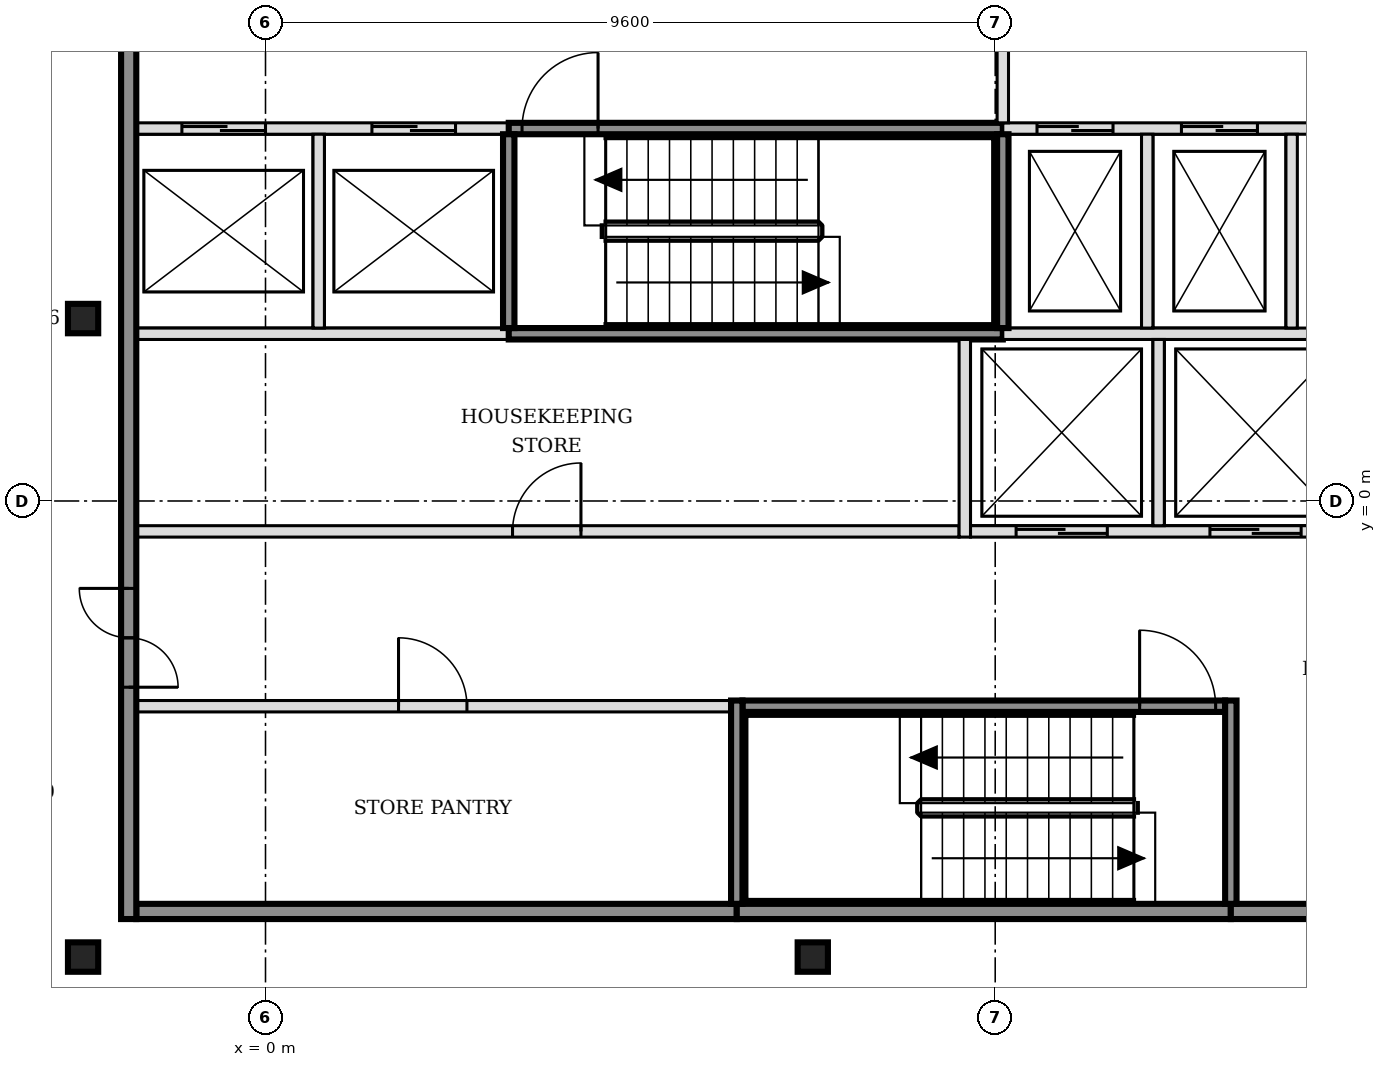
"""IFC4 building model, lengths in metres.
Left out: names, types, materials, properties, quantities, classifications, styles, units other than length and angle.
Written with IfcOpenShell. Run it as: python <this file> out.ifc"""

import sys

from ifc_helpers import new_model, si_unit, direction, frame, frame_2d, origin, origin_2d, place, context, subcontext, project, spatial, rectangle, i_section, extrude, element, fill, save


model = new_model("IFC4")
c1 = context("Model", 3, precision=1e-05, world=origin(), true_north=direction((0.0, 1.0)))
c2 = subcontext(c1, "Body", "Model", "MODEL_VIEW")
j1 = project(units=[si_unit("LENGTHUNIT", "METRE"), si_unit("PLANEANGLEUNIT", "RADIAN")], contexts=[c1])
p1 = place(None, origin())
s1 = spatial("IfcSite", under=j1, at=p1, CompositionType="ELEMENT")
p2 = place(p1, origin())
s2 = spatial("IfcBuilding", under=s1, at=p2, CompositionType="ELEMENT")
p3 = place(p2, frame((0.0, 0.0, 267.0)))
s3 = spatial("IfcBuildingStorey", under=s2, at=p3, CompositionType="ELEMENT", Elevation=267.0)
for number, where, z_axis, x_axis in (
    (1, (-2.4, -6.0, -0.15), (0.0, 0.0, 1.0), (1.0, 0.0, 0.0)),
    (2, (7.2, -6.0, -0.15), (0.0, 0.0, 1.0), (1.0, 0.0, 0.0)),
    (3, (-2.4, 2.4, -0.15), (0.0, 0.0, 1.0), (1.0, 0.0, 0.0)),
):
    element("IfcColumn", number, at=place(p3, frame(where, z_axis=z_axis, x_axis=x_axis)), inside=s3, PredefinedType="COLUMN", context=c2, shape_type="SweptSolid", body=[
        extrude(i_section(OverallWidth=0.398, OverallDepth=0.387, WebThickness=0.021, FlangeThickness=0.033, FilletRadius=0.015, at=origin_2d()), origin(), (0.0, 0.0, 1.0), 3.6),
    ])
p4 = place(p3, frame((-1.7, -5.4, 0.0), z_axis=(0.0, 0.0, 1.0), x_axis=(1.0, 0.0, 0.0)))
e4 = element("IfcWall", 4, at=p4, inside=s3, PredefinedType="SOLIDWALL", context=c2, shape_type="SweptSolid", body=[
    extrude(rectangle(XDim=7.9, YDim=0.2, at=frame_2d((3.95, 0.0))), origin(), (0.0, 0.0, 1.0), 3.45),
])
p5 = place(p3, frame((6.2, -5.4, 0.0), z_axis=(0.0, 0.0, 1.0), x_axis=(1.0, 0.0, 0.0)))
e5 = element("IfcWall", 5, at=p5, inside=s3, PredefinedType="SOLIDWALL", context=c2, shape_type="SweptSolid", body=[
    extrude(rectangle(XDim=6.5, YDim=0.2, at=frame_2d((3.25, 0.0))), origin(), (0.0, 0.0, 1.0), 3.45),
])
p6 = place(p3, frame((12.7, -5.4, 0.0), z_axis=(0.0, 0.0, 1.0), x_axis=(1.0, 0.0, 0.0)))
e6 = element("IfcWall", 6, at=p6, inside=s3, PredefinedType="SOLIDWALL", context=c2, shape_type="SweptSolid", body=[
    extrude(rectangle(XDim=3.4, YDim=0.2, at=frame_2d((1.7, 0.0))), origin(), (0.0, 0.0, 1.0), 3.45),
])
p7 = place(p3, frame((-1.7, -2.7, 0.0), z_axis=(0.0, 0.0, 1.0), x_axis=(1.0, 0.0, 0.0)))
e7 = element("IfcWall", 7, at=p7, inside=s3, PredefinedType="PARTITIONING", context=c2, shape_type="SweptSolid", body=[
    extrude(rectangle(XDim=7.825, YDim=0.15, at=frame_2d((3.913, 0.0))), origin(), (0.0, 0.0, 1.0), 3.45),
])
p8 = place(p7, frame((3.45, 0.0, 0.0)))
e8 = element("IfcOpeningElement", 8, at=p8, cuts=e7, PredefinedType="OPENING", context=c2, shape_type="SweptSolid", body=[
    extrude(rectangle(XDim=0.9, YDim=2.1, at=frame_2d((0.45, 1.05))), frame((0.0, 0.085, 0.0), z_axis=(0.0, -1.0, 0.0), x_axis=(1.0, 0.0, 0.0)), (0.0, 0.0, 1.0), 0.17),
])
p9 = place(p3, frame((6.275, -2.7, 0.0), z_axis=(0.0, 0.0, 1.0), x_axis=(1.0, 0.0, 0.0)))
e9 = element("IfcWall", 9, at=p9, inside=s3, PredefinedType="SOLIDWALL", context=c2, shape_type="SweptSolid", body=[
    extrude(rectangle(XDim=6.35, YDim=0.15, at=frame_2d((3.175, 0.0))), origin(), (0.0, 0.0, 1.0), 3.45),
])
p10 = place(p9, frame((5.225, 0.0, 0.0)))
e10 = element("IfcOpeningElement", 10, at=p10, cuts=e9, PredefinedType="OPENING", context=c2, shape_type="SweptSolid", body=[
    extrude(rectangle(XDim=1.0, YDim=2.1, at=frame_2d((0.5, 1.05))), frame((0.0, 0.085, 0.0), z_axis=(0.0, -1.0, 0.0), x_axis=(1.0, 0.0, 0.0)), (0.0, 0.0, 1.0), 0.17),
])
p11 = place(p3, frame((-1.7, -0.4, 0.0), z_axis=(0.0, 0.0, 1.0), x_axis=(1.0, 0.0, 0.0)))
e11 = element("IfcWall", 11, at=p11, inside=s3, PredefinedType="PARTITIONING", context=c2, shape_type="SweptSolid", body=[
    extrude(rectangle(XDim=10.825, YDim=0.15, at=frame_2d((5.413, 0.0))), origin(), (0.0, 0.0, 1.0), 3.45),
])
p12 = place(p11, frame((4.95, 0.0, 0.0)))
e12 = element("IfcOpeningElement", 12, at=p12, cuts=e11, PredefinedType="OPENING", context=c2, shape_type="SweptSolid", body=[
    extrude(rectangle(XDim=0.9, YDim=2.1, at=frame_2d((0.45, 1.05))), frame((0.0, 0.085, 0.0), z_axis=(0.0, -1.0, 0.0), x_axis=(1.0, 0.0, 0.0)), (0.0, 0.0, 1.0), 0.17),
])
p13 = place(p3, frame((9.275, -0.4, 0.0), z_axis=(0.0, 0.0, 1.0), x_axis=(1.0, 0.0, 0.0)))
e13 = element("IfcWall", 13, at=p13, inside=s3, PredefinedType="SOLIDWALL", context=c2, shape_type="SweptSolid", body=[
    extrude(rectangle(XDim=4.95, YDim=0.15, at=frame_2d((2.475, 0.0))), origin(), (0.0, 0.0, 1.0), 3.45),
])
p14 = place(p13, frame((0.6, 0.0, 0.0)))
e14 = element("IfcOpeningElement", 14, at=p14, cuts=e13, PredefinedType="OPENING", context=c2, shape_type="SweptSolid", body=[
    extrude(rectangle(XDim=1.2, YDim=2.1, at=frame_2d((0.6, 1.05))), frame((0.0, 0.085, 0.0), z_axis=(0.0, -1.0, 0.0), x_axis=(1.0, 0.0, 0.0)), (0.0, 0.0, 1.0), 0.17),
])
p15 = place(p13, frame((3.15, 0.0, 0.0)))
e15 = element("IfcOpeningElement", 15, at=p15, cuts=e13, PredefinedType="OPENING", context=c2, shape_type="SweptSolid", body=[
    extrude(rectangle(XDim=1.2, YDim=2.1, at=frame_2d((0.6, 1.05))), frame((0.0, 0.085, 0.0), z_axis=(0.0, -1.0, 0.0), x_axis=(1.0, 0.0, 0.0)), (0.0, 0.0, 1.0), 0.17),
])
p16 = place(p3, frame((-1.7, 2.2, 0.0), z_axis=(0.0, 0.0, 1.0), x_axis=(1.0, 0.0, 0.0)))
e16 = element("IfcWall", 16, at=p16, inside=s3, PredefinedType="SOLIDWALL", context=c2, shape_type="SweptSolid", body=[
    extrude(rectangle(XDim=4.9, YDim=0.15, at=frame_2d((2.45, 0.0))), origin(), (0.0, 0.0, 1.0), 3.45),
])
p17 = place(p3, frame((3.2, 2.2, 0.0), z_axis=(0.0, 0.0, 1.0), x_axis=(1.0, 0.0, 0.0)))
e17 = element("IfcWall", 17, at=p17, inside=s3, PredefinedType="SOLIDWALL", context=c2, shape_type="SweptSolid", body=[
    extrude(rectangle(XDim=6.5, YDim=0.15, at=frame_2d((3.25, 0.0))), origin(), (0.0, 0.0, 1.0), 3.45),
])
p18 = place(p3, frame((9.7, 2.2, 0.0), z_axis=(0.0, 0.0, 1.0), x_axis=(1.0, 0.0, 0.0)))
e18 = element("IfcWall", 18, at=p18, inside=s3, PredefinedType="SOLIDWALL", context=c2, shape_type="SweptSolid", body=[
    extrude(rectangle(XDim=4.525, YDim=0.15, at=frame_2d((2.263, 0.0))), origin(), (0.0, 0.0, 1.0), 3.45),
])
p19 = place(p3, frame((-1.7, 4.9, 0.0), z_axis=(0.0, 0.0, 1.0), x_axis=(1.0, 0.0, 0.0)))
e19 = element("IfcWall", 19, at=p19, inside=s3, PredefinedType="SOLIDWALL", context=c2, shape_type="SweptSolid", body=[
    extrude(rectangle(XDim=4.9, YDim=0.15, at=frame_2d((2.45, 0.0))), origin(), (0.0, 0.0, 1.0), 3.45),
])
p20 = place(p19, frame((0.6, 0.0, 0.0)))
e20 = element("IfcOpeningElement", 20, at=p20, cuts=e19, PredefinedType="OPENING", context=c2, shape_type="SweptSolid", body=[
    extrude(rectangle(XDim=1.1, YDim=2.1, at=frame_2d((0.55, 1.05))), frame((0.0, 0.085, 0.0), z_axis=(0.0, -1.0, 0.0), x_axis=(1.0, 0.0, 0.0)), (0.0, 0.0, 1.0), 0.17),
])
p21 = place(p19, frame((3.1, 0.0, 0.0)))
e21 = element("IfcOpeningElement", 21, at=p21, cuts=e19, PredefinedType="OPENING", context=c2, shape_type="SweptSolid", body=[
    extrude(rectangle(XDim=1.1, YDim=2.1, at=frame_2d((0.55, 1.05))), frame((0.0, 0.085, 0.0), z_axis=(0.0, -1.0, 0.0), x_axis=(1.0, 0.0, 0.0)), (0.0, 0.0, 1.0), 0.17),
])
p22 = place(p3, frame((3.2, 4.9, 0.0), z_axis=(0.0, 0.0, 1.0), x_axis=(1.0, 0.0, 0.0)))
e22 = element("IfcWall", 22, at=p22, inside=s3, PredefinedType="SOLIDWALL", context=c2, shape_type="SweptSolid", body=[
    extrude(rectangle(XDim=6.5, YDim=0.15, at=frame_2d((3.25, 0.0))), origin(), (0.0, 0.0, 1.0), 3.45),
])
p23 = place(p22, frame((0.175, 0.0, 0.0)))
e23 = element("IfcOpeningElement", 23, at=p23, cuts=e22, PredefinedType="OPENING", context=c2, shape_type="SweptSolid", body=[
    extrude(rectangle(XDim=1.0, YDim=2.1, at=frame_2d((0.5, 1.05))), frame((0.0, 0.085, 0.0), z_axis=(0.0, -1.0, 0.0), x_axis=(1.0, 0.0, 0.0)), (0.0, 0.0, 1.0), 0.17),
])
p24 = place(p3, frame((9.7, 4.9, 0.0), z_axis=(0.0, 0.0, 1.0), x_axis=(1.0, 0.0, 0.0)))
e24 = element("IfcWall", 24, at=p24, inside=s3, PredefinedType="SOLIDWALL", context=c2, shape_type="SweptSolid", body=[
    extrude(rectangle(XDim=6.4, YDim=0.15, at=frame_2d((3.2, 0.0))), origin(), (0.0, 0.0, 1.0), 3.45),
])
p25 = place(p24, frame((0.45, 0.0, 0.0)))
e25 = element("IfcOpeningElement", 25, at=p25, cuts=e24, PredefinedType="OPENING", context=c2, shape_type="SweptSolid", body=[
    extrude(rectangle(XDim=1.0, YDim=2.1, at=frame_2d((0.5, 1.05))), frame((0.0, 0.085, 0.0), z_axis=(0.0, -1.0, 0.0), x_axis=(1.0, 0.0, 0.0)), (0.0, 0.0, 1.0), 0.17),
])
p26 = place(p24, frame((2.35, 0.0, 0.0)))
e26 = element("IfcOpeningElement", 26, at=p26, cuts=e24, PredefinedType="OPENING", context=c2, shape_type="SweptSolid", body=[
    extrude(rectangle(XDim=1.0, YDim=2.1, at=frame_2d((0.5, 1.05))), frame((0.0, 0.085, 0.0), z_axis=(0.0, -1.0, 0.0), x_axis=(1.0, 0.0, 0.0)), (0.0, 0.0, 1.0), 0.17),
])
p27 = place(p24, frame((4.7, 0.0, 0.0)))
e27 = element("IfcOpeningElement", 27, at=p27, cuts=e24, PredefinedType="OPENING", context=c2, shape_type="SweptSolid", body=[
    extrude(rectangle(XDim=0.9, YDim=2.1, at=frame_2d((0.45, 1.05))), frame((0.0, 0.085, 0.0), z_axis=(0.0, -1.0, 0.0), x_axis=(1.0, 0.0, 0.0)), (0.0, 0.0, 1.0), 0.17),
])
p28 = place(p3, frame((-1.8, -5.5, 0.0), z_axis=(0.0, 0.0, 1.0), x_axis=(0.0, 1.0, 0.0)))
e28 = element("IfcWall", 28, at=p28, inside=s3, PredefinedType="SOLIDWALL", context=c2, shape_type="SweptSolid", body=[
    extrude(rectangle(XDim=15.8, YDim=0.2, at=frame_2d((7.9, 0.0))), origin(), (0.0, 0.0, 1.0), 3.45),
])
p29 = place(p28, frame((3.05, 0.0, 0.0)))
e29 = element("IfcOpeningElement", 29, at=p29, cuts=e28, PredefinedType="OPENING", context=c2, shape_type="SweptSolid", body=[
    extrude(rectangle(XDim=1.3, YDim=2.1, at=frame_2d((0.65, 1.05))), frame((0.0, 0.11, 0.0), z_axis=(0.0, -1.0, 0.0), x_axis=(1.0, 0.0, 0.0)), (0.0, 0.0, 1.0), 0.22),
])
p30 = place(p28, frame((11.45, 0.0, 0.0)))
e30 = element("IfcOpeningElement", 30, at=p30, cuts=e28, PredefinedType="OPENING", context=c2, shape_type="SweptSolid", body=[
    extrude(rectangle(XDim=1.3, YDim=2.1, at=frame_2d((0.65, 1.05))), frame((0.0, 0.11, 0.0), z_axis=(0.0, -1.0, 0.0), x_axis=(1.0, 0.0, 0.0)), (0.0, 0.0, 1.0), 0.22),
])
for number, where, z_axis, x_axis in (
    (31, (0.7, 2.275, 0.0), (0.0, 0.0, 1.0), (0.0, 1.0, 0.0)),
    (32, (3.2, 2.275, 0.0), (0.0, 0.0, 1.0), (0.0, 1.0, 0.0)),
):
    element("IfcWall", number, at=place(p3, frame(where, z_axis=z_axis, x_axis=x_axis)), inside=s3, PredefinedType="SOLIDWALL", context=c2, shape_type="SweptSolid", body=[
        extrude(rectangle(XDim=2.55, YDim=0.15, at=frame_2d((1.275, 0.0))), origin(), (0.0, 0.0, 1.0), 3.45),
    ])
p31 = place(p3, frame((6.2, -5.3, 0.0), z_axis=(0.0, 0.0, 1.0), x_axis=(0.0, 1.0, 0.0)))
e33 = element("IfcWall", 33, at=p31, inside=s3, PredefinedType="SOLIDWALL", context=c2, shape_type="SweptSolid", body=[
    extrude(rectangle(XDim=2.675, YDim=0.15, at=frame_2d((1.337, 0.0))), origin(), (0.0, 0.0, 1.0), 3.45),
])
p32 = place(p3, frame((9.2, -0.475, 0.0), z_axis=(0.0, 0.0, 1.0), x_axis=(0.0, 1.0, 0.0)))
e34 = element("IfcWall", 34, at=p32, inside=s3, PredefinedType="SOLIDWALL", context=c2, shape_type="SweptSolid", body=[
    extrude(rectangle(XDim=2.6, YDim=0.15, at=frame_2d((1.3, 0.0))), origin(), (0.0, 0.0, 1.0), 3.45),
])
p33 = place(p3, frame((9.7, 2.275, 0.0), z_axis=(0.0, 0.0, 1.0), x_axis=(0.0, 1.0, 0.0)))
e35 = element("IfcWall", 35, at=p33, inside=s3, PredefinedType="SOLIDWALL", context=c2, shape_type="SweptSolid", body=[
    extrude(rectangle(XDim=2.55, YDim=0.15, at=frame_2d((1.275, 0.0))), origin(), (0.0, 0.0, 1.0), 3.45),
])
p34 = place(p3, frame((9.7, 4.975, 0.0), z_axis=(0.0, 0.0, 1.0), x_axis=(0.0, 1.0, 0.0)))
e36 = element("IfcWall", 36, at=p34, inside=s3, PredefinedType="SOLIDWALL", context=c2, shape_type="SweptSolid", body=[
    extrude(rectangle(XDim=2.45, YDim=0.15, at=frame_2d((1.225, 0.0))), origin(), (0.0, 0.0, 1.0), 3.45),
])
p35 = place(p3, frame((11.6, 2.275, 0.0), z_axis=(0.0, 0.0, 1.0), x_axis=(0.0, 1.0, 0.0)))
e37 = element("IfcWall", 37, at=p35, inside=s3, PredefinedType="SOLIDWALL", context=c2, shape_type="SweptSolid", body=[
    extrude(rectangle(XDim=2.55, YDim=0.15, at=frame_2d((1.275, 0.0))), origin(), (0.0, 0.0, 1.0), 3.45),
])
p36 = place(p3, frame((11.75, -0.325, 0.0), z_axis=(0.0, 0.0, 1.0), x_axis=(0.0, 1.0, 0.0)))
e38 = element("IfcWall", 38, at=p36, inside=s3, PredefinedType="SOLIDWALL", context=c2, shape_type="SweptSolid", body=[
    extrude(rectangle(XDim=2.45, YDim=0.15, at=frame_2d((1.225, 0.0))), origin(), (0.0, 0.0, 1.0), 3.45),
])
p37 = place(p3, frame((12.7, -5.3, 0.0), z_axis=(0.0, 0.0, 1.0), x_axis=(0.0, 1.0, 0.0)))
e39 = element("IfcWall", 39, at=p37, inside=s3, PredefinedType="SOLIDWALL", context=c2, shape_type="SweptSolid", body=[
    extrude(rectangle(XDim=2.675, YDim=0.15, at=frame_2d((1.337, 0.0))), origin(), (0.0, 0.0, 1.0), 3.45),
])
p38 = place(p3, frame((13.5, 2.275, 0.0), z_axis=(0.0, 0.0, 1.0), x_axis=(0.0, 1.0, 0.0)))
e40 = element("IfcWall", 40, at=p38, inside=s3, PredefinedType="SOLIDWALL", context=c2, shape_type="SweptSolid", body=[
    extrude(rectangle(XDim=2.55, YDim=0.15, at=frame_2d((1.275, 0.0))), origin(), (0.0, 0.0, 1.0), 3.45),
])
p39 = place(p14, origin())
e41 = element("IfcDoor", 41, at=p39, inside=s3, OperationType="DOUBLE_DOOR_SLIDING", PredefinedType="DOOR", context=c2, shape_type="SweptSolid", body=[
    extrude(rectangle(XDim=1.2, YDim=2.1, at=frame_2d((0.6, 1.05))), frame((0.0, 0.025, 0.0), z_axis=(0.0, -1.0, 0.0), x_axis=(1.0, 0.0, 0.0)), (0.0, 0.0, 1.0), 0.05),
])
fill(e14, e41)
p40 = place(p15, origin())
e42 = element("IfcDoor", 42, at=p40, inside=s3, OperationType="DOUBLE_DOOR_SLIDING", PredefinedType="DOOR", context=c2, shape_type="SweptSolid", body=[
    extrude(rectangle(XDim=1.2, YDim=2.1, at=frame_2d((0.6, 1.05))), frame((0.0, 0.025, 0.0), z_axis=(0.0, -1.0, 0.0), x_axis=(1.0, 0.0, 0.0)), (0.0, 0.0, 1.0), 0.05),
])
fill(e15, e42)
p41 = place(p20, origin())
e43 = element("IfcDoor", 43, at=p41, inside=s3, OperationType="DOUBLE_DOOR_SLIDING", PredefinedType="DOOR", context=c2, shape_type="SweptSolid", body=[
    extrude(rectangle(XDim=1.1, YDim=2.1, at=frame_2d((0.55, 1.05))), frame((0.0, 0.025, 0.0), z_axis=(0.0, -1.0, 0.0), x_axis=(1.0, 0.0, 0.0)), (0.0, 0.0, 1.0), 0.05),
])
fill(e20, e43)
p42 = place(p21, origin())
e44 = element("IfcDoor", 44, at=p42, inside=s3, OperationType="DOUBLE_DOOR_SLIDING", PredefinedType="DOOR", context=c2, shape_type="SweptSolid", body=[
    extrude(rectangle(XDim=1.1, YDim=2.1, at=frame_2d((0.55, 1.05))), frame((0.0, 0.025, 0.0), z_axis=(0.0, -1.0, 0.0), x_axis=(1.0, 0.0, 0.0)), (0.0, 0.0, 1.0), 0.05),
])
fill(e21, e44)
p43 = place(p25, origin())
e45 = element("IfcDoor", 45, at=p43, inside=s3, OperationType="DOUBLE_DOOR_SLIDING", PredefinedType="DOOR", context=c2, shape_type="SweptSolid", body=[
    extrude(rectangle(XDim=1.0, YDim=2.1, at=frame_2d((0.5, 1.05))), frame((0.0, 0.025, 0.0), z_axis=(0.0, -1.0, 0.0), x_axis=(1.0, 0.0, 0.0)), (0.0, 0.0, 1.0), 0.05),
])
fill(e25, e45)
p44 = place(p26, origin())
e46 = element("IfcDoor", 46, at=p44, inside=s3, OperationType="DOUBLE_DOOR_SLIDING", PredefinedType="DOOR", context=c2, shape_type="SweptSolid", body=[
    extrude(rectangle(XDim=1.0, YDim=2.1, at=frame_2d((0.5, 1.05))), frame((0.0, 0.025, 0.0), z_axis=(0.0, -1.0, 0.0), x_axis=(1.0, 0.0, 0.0)), (0.0, 0.0, 1.0), 0.05),
])
fill(e26, e46)
p45 = place(p10, origin())
e47 = element("IfcDoor", 47, at=p45, inside=s3, OperationType="SINGLE_SWING_LEFT", PredefinedType="DOOR", context=c2, shape_type="SweptSolid", body=[
    extrude(rectangle(XDim=1.0, YDim=2.1, at=frame_2d((0.5, 1.05))), frame((0.0, 0.025, 0.0), z_axis=(0.0, -1.0, 0.0), x_axis=(1.0, 0.0, 0.0)), (0.0, 0.0, 1.0), 0.05),
])
fill(e10, e47)
p46 = place(p23, origin())
e48 = element("IfcDoor", 48, at=p46, inside=s3, OperationType="SINGLE_SWING_RIGHT", PredefinedType="DOOR", context=c2, shape_type="SweptSolid", body=[
    extrude(rectangle(XDim=1.0, YDim=2.1, at=frame_2d((0.5, 1.05))), frame((0.0, 0.025, 0.0), z_axis=(0.0, -1.0, 0.0), x_axis=(1.0, 0.0, 0.0)), (0.0, 0.0, 1.0), 0.05),
])
fill(e23, e48)
p47 = place(p29, origin())
e49 = element("IfcDoor", 49, at=p47, inside=s3, OperationType="DOUBLE_DOOR_SINGLE_SWING", PredefinedType="DOOR", context=c2, shape_type="SweptSolid", body=[
    extrude(rectangle(XDim=1.3, YDim=2.1, at=frame_2d((0.65, 1.05))), frame((0.0, 0.025, 0.0), z_axis=(0.0, -1.0, 0.0), x_axis=(1.0, 0.0, 0.0)), (0.0, 0.0, 1.0), 0.05),
])
fill(e29, e49)
p48 = place(p8, origin())
e50 = element("IfcDoor", 50, at=p48, inside=s3, OperationType="SINGLE_SWING_LEFT", PredefinedType="DOOR", context=c2, shape_type="SweptSolid", body=[
    extrude(rectangle(XDim=0.9, YDim=2.1, at=frame_2d((0.45, 1.05))), frame((0.0, 0.025, 0.0), z_axis=(0.0, -1.0, 0.0), x_axis=(1.0, 0.0, 0.0)), (0.0, 0.0, 1.0), 0.05),
])
fill(e8, e50)
p49 = place(p12, origin())
e51 = element("IfcDoor", 51, at=p49, inside=s3, OperationType="SINGLE_SWING_RIGHT", PredefinedType="DOOR", context=c2, shape_type="SweptSolid", body=[
    extrude(rectangle(XDim=0.9, YDim=2.1, at=frame_2d((0.45, 1.05))), frame((0.0, 0.025, 0.0), z_axis=(0.0, -1.0, 0.0), x_axis=(1.0, 0.0, 0.0)), (0.0, 0.0, 1.0), 0.05),
])
fill(e12, e51)
save(model, sys.argv[1])
